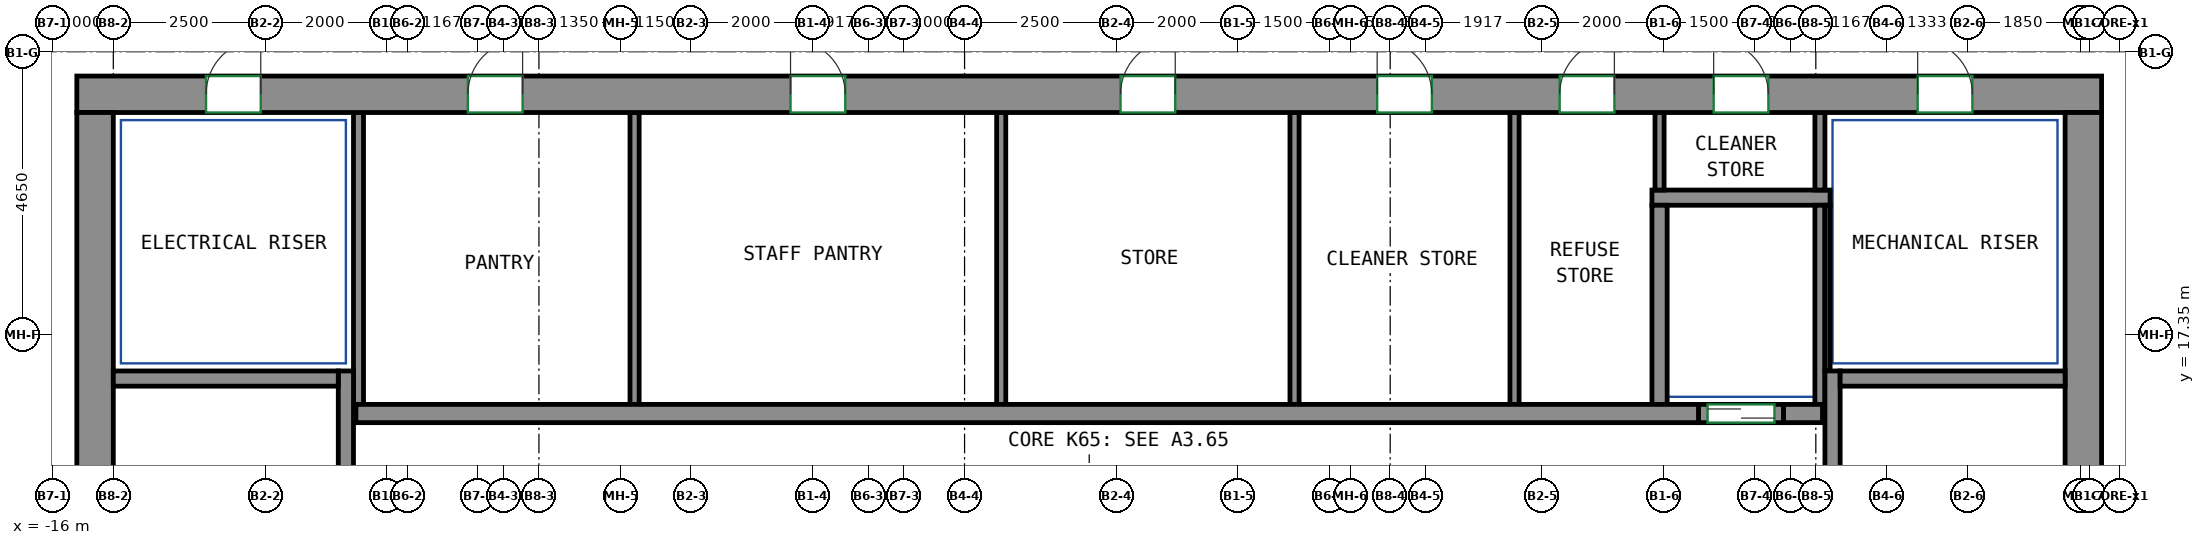
"""IFC4 building model, lengths in metres.
Left out: names, types, materials, properties, quantities, classifications, styles, units other than length and angle.
Written with IfcOpenShell. Run it as: python <this file> out.ifc"""

import sys

from ifc_helpers import new_model, si_unit, direction, frame, frame_2d, origin, place, context, subcontext, project, spatial, rectangle, extrude, source, transform, mapped, element, fill, save


model = new_model("IFC4")
c1 = context("Model", 3, precision=1e-05, world=origin(), true_north=direction((0.0, 1.0)))
c2 = subcontext(c1, "Body", "Model", "MODEL_VIEW")
j1 = project(units=[si_unit("LENGTHUNIT", "METRE"), si_unit("PLANEANGLEUNIT", "RADIAN")], contexts=[c1])
p1 = place(None, origin())
s1 = spatial("IfcSite", under=j1, at=p1, CompositionType="ELEMENT")
p2 = place(p1, origin())
s2 = spatial("IfcBuilding", under=s1, at=p2, CompositionType="ELEMENT")
p3 = place(p2, frame((0.0, 0.0, 262.8)))
s3 = spatial("IfcBuildingStorey", under=s2, at=p3, CompositionType="ELEMENT", Elevation=262.8)
m1 = source(origin(), c2, "Body", "SweptSolid", [
    extrude(rectangle(XDim=33.3, YDim=0.6, at=frame_2d((16.65, 0.0))), origin(), (0.0, 0.0, 1.0), 3.8),
])
p4 = place(p3, frame((-15.6, 21.3, 0.0), z_axis=(0.0, 0.0, 1.0), x_axis=(1.0, 0.0, 0.0)))
e1 = element("IfcWall", 1, at=p4, inside=s3, PredefinedType="SHEAR", context=c2, shape_type="MappedRepresentation", body=[
    mapped(m1, transform((0.0, 0.0, 0.0))),
])
p5 = place(p4, frame((6.431, 0.0, 0.0)))
e2 = element("IfcOpeningElement", 2, at=p5, cuts=e1, PredefinedType="OPENING", context=c2, shape_type="SweptSolid", body=[
    extrude(rectangle(XDim=0.9, YDim=2.1, at=frame_2d((0.45, 1.05))), frame((0.0, 0.31, 0.0), z_axis=(0.0, -1.0, 0.0), x_axis=(1.0, 0.0, 0.0)), (0.0, 0.0, 1.0), 0.62),
])
p6 = place(p4, frame((11.738, 0.0, 0.0)))
e3 = element("IfcOpeningElement", 3, at=p6, cuts=e1, PredefinedType="OPENING", context=c2, shape_type="SweptSolid", body=[
    extrude(rectangle(XDim=0.9, YDim=2.1, at=frame_2d((0.45, 1.05))), frame((0.0, 0.31, 0.0), z_axis=(0.0, -1.0, 0.0), x_axis=(1.0, 0.0, 0.0)), (0.0, 0.0, 1.0), 0.62),
])
p7 = place(p4, frame((17.165, 0.0, 0.0)))
e4 = element("IfcOpeningElement", 4, at=p7, cuts=e1, PredefinedType="OPENING", context=c2, shape_type="SweptSolid", body=[
    extrude(rectangle(XDim=0.9, YDim=2.1, at=frame_2d((0.45, 1.05))), frame((0.0, 0.31, 0.0), z_axis=(0.0, -1.0, 0.0), x_axis=(1.0, 0.0, 0.0)), (0.0, 0.0, 1.0), 0.62),
])
p8 = place(p4, frame((21.386, 0.0, 0.0)))
e5 = element("IfcOpeningElement", 5, at=p8, cuts=e1, PredefinedType="OPENING", context=c2, shape_type="SweptSolid", body=[
    extrude(rectangle(XDim=0.9, YDim=2.1, at=frame_2d((0.45, 1.05))), frame((0.0, 0.31, 0.0), z_axis=(0.0, -1.0, 0.0), x_axis=(1.0, 0.0, 0.0)), (0.0, 0.0, 1.0), 0.62),
])
p9 = place(p4, frame((24.387, 0.0, 0.0)))
e6 = element("IfcOpeningElement", 6, at=p9, cuts=e1, PredefinedType="OPENING", context=c2, shape_type="SweptSolid", body=[
    extrude(rectangle(XDim=0.9, YDim=2.1, at=frame_2d((0.45, 1.05))), frame((0.0, 0.31, 0.0), z_axis=(0.0, -1.0, 0.0), x_axis=(1.0, 0.0, 0.0)), (0.0, 0.0, 1.0), 0.62),
])
p10 = place(p4, frame((26.92, 0.0, 0.0)))
e7 = element("IfcOpeningElement", 7, at=p10, cuts=e1, PredefinedType="OPENING", context=c2, shape_type="SweptSolid", body=[
    extrude(rectangle(XDim=0.9, YDim=2.1, at=frame_2d((0.45, 1.05))), frame((0.0, 0.31, 0.0), z_axis=(0.0, -1.0, 0.0), x_axis=(1.0, 0.0, 0.0)), (0.0, 0.0, 1.0), 0.62),
])
p11 = place(p4, frame((2.125, 0.0, 0.0)))
e8 = element("IfcOpeningElement", 8, at=p11, cuts=e1, PredefinedType="OPENING", context=c2, shape_type="SweptSolid", body=[
    extrude(rectangle(XDim=0.9, YDim=2.1, at=frame_2d((0.45, 1.05))), frame((0.0, 0.31, 0.0), z_axis=(0.0, -1.0, 0.0), x_axis=(1.0, 0.0, 0.0)), (0.0, 0.0, 1.0), 0.62),
])
p12 = place(p4, frame((30.275, 0.0, 0.0)))
e9 = element("IfcOpeningElement", 9, at=p12, cuts=e1, PredefinedType="OPENING", context=c2, shape_type="SweptSolid", body=[
    extrude(rectangle(XDim=0.9, YDim=2.1, at=frame_2d((0.45, 1.05))), frame((0.0, 0.31, 0.0), z_axis=(0.0, -1.0, 0.0), x_axis=(1.0, 0.0, 0.0)), (0.0, 0.0, 1.0), 0.62),
])
m2 = source(origin(), c2, "Body", "SweptSolid", [
    extrude(rectangle(XDim=12.0, YDim=0.6, at=frame_2d((6.0, 0.0))), origin(), (0.0, 0.0, 1.0), 3.8),
])
for number, where, z_axis, x_axis in (
    (10, (-15.3, 9.0, 0.0), (0.0, 0.0, 1.0), (0.0, 1.0, 0.0)),
    (11, (17.4, 9.0, 0.0), (0.0, 0.0, 1.0), (0.0, 1.0, 0.0)),
):
    element("IfcWall", number, at=place(p3, frame(where, z_axis=z_axis, x_axis=x_axis)), inside=s3, PredefinedType="SHEAR", context=c2, shape_type="MappedRepresentation", body=[
        mapped(m2, transform((0.0, 0.0, 0.0))),
    ])
m3 = source(origin(), c2, "Body", "SweptSolid", [
    extrude(rectangle(XDim=7.75, YDim=0.25, at=frame_2d((3.875, 0.0))), origin(), (0.0, 0.0, 1.0), 3.8),
])
p13 = place(p3, frame((-11.175, 9.0, 0.0), z_axis=(0.0, 0.0, 1.0), x_axis=(0.0, 1.0, 0.0)))
e12 = element("IfcWall", 12, at=p13, inside=s3, PredefinedType="SHEAR", context=c2, shape_type="MappedRepresentation", body=[
    mapped(m3, transform((0.0, 0.0, 0.0))),
])
m4 = source(origin(), c2, "Body", "SweptSolid", [
    extrude(rectangle(XDim=3.7, YDim=0.25, at=frame_2d((1.85, 0.0))), origin(), (0.0, 0.0, 1.0), 3.8),
])
p14 = place(p3, frame((-15.0, 16.625, 0.0), z_axis=(0.0, 0.0, 1.0), x_axis=(1.0, 0.0, 0.0)))
e13 = element("IfcWall", 13, at=p14, inside=s3, PredefinedType="SHEAR", context=c2, shape_type="MappedRepresentation", body=[
    mapped(m4, transform((0.0, 0.0, 0.0))),
])
p15 = place(p3, frame((13.275, 9.0, 0.0), z_axis=(0.0, 0.0, 1.0), x_axis=(0.0, 1.0, 0.0)))
e14 = element("IfcWall", 14, at=p15, inside=s3, PredefinedType="SHEAR", context=c2, shape_type="MappedRepresentation", body=[
    mapped(m3, transform((0.0, 0.0, 0.0))),
])
m5 = source(origin(), c2, "Body", "SweptSolid", [
    extrude(rectangle(XDim=3.7, YDim=0.25, at=frame_2d((1.85, 0.0))), origin(), (0.0, 0.0, 1.0), 3.8),
])
p16 = place(p3, frame((13.4, 16.625, 0.0), z_axis=(0.0, 0.0, 1.0), x_axis=(1.0, 0.0, 0.0)))
e15 = element("IfcWall", 15, at=p16, inside=s3, PredefinedType="SHEAR", context=c2, shape_type="MappedRepresentation", body=[
    mapped(m5, transform((0.0, 0.0, 0.0))),
])
m6 = source(origin(), c2, "Body", "SweptSolid", [
    extrude(rectangle(XDim=22.08, YDim=0.3, at=frame_2d((11.04, 0.0))), origin(), (0.0, 0.0, 1.0), 3.8),
])
p17 = place(p3, frame((-11.01, 16.05, 0.0), z_axis=(0.0, 0.0, 1.0), x_axis=(1.0, 0.0, 0.0)))
e16 = element("IfcWall", 16, at=p17, inside=s3, PredefinedType="SHEAR", context=c2, shape_type="MappedRepresentation", body=[
    mapped(m6, transform((0.0, 0.0, 0.0))),
])
m7 = source(origin(), c2, "Body", "SweptSolid", [
    extrude(rectangle(XDim=0.64, YDim=0.3, at=frame_2d((0.32, 0.0))), origin(), (0.0, 0.0, 1.0), 3.8),
])
p18 = place(p3, frame((12.47, 16.05, 0.0), z_axis=(0.0, 0.0, 1.0), x_axis=(1.0, 0.0, 0.0)))
e17 = element("IfcWall", 17, at=p18, inside=s3, PredefinedType="SHEAR", context=c2, shape_type="MappedRepresentation", body=[
    mapped(m7, transform((0.0, 0.0, 0.0))),
])
m8 = source(origin(), c2, "Body", "SweptSolid", [
    extrude(rectangle(XDim=1.4, YDim=0.3, at=frame_2d((0.7, 0.0))), origin(), (0.0, 0.0, 1.0), 3.8),
])
p19 = place(p3, frame((11.07, 16.05, 0.0), z_axis=(0.0, 0.0, 1.0), x_axis=(1.0, 0.0, 0.0)))
e18 = element("IfcWall", 18, at=p19, inside=s3, PredefinedType="PARTITIONING", context=c2, shape_type="MappedRepresentation", body=[
    mapped(m8, transform((0.0, 0.0, 0.0))),
])
p20 = place(p19, frame((0.15, 0.0, 0.0)))
e19 = element("IfcOpeningElement", 19, at=p20, cuts=e18, PredefinedType="OPENING", context=c2, shape_type="SweptSolid", body=[
    extrude(rectangle(XDim=1.1, YDim=2.1, at=frame_2d((0.55, 1.05))), frame((0.0, 0.16, 0.0), z_axis=(0.0, -1.0, 0.0), x_axis=(1.0, 0.0, 0.0)), (0.0, 0.0, 1.0), 0.32),
])
m9 = source(origin(), c2, "Body", "SweptSolid", [
    extrude(rectangle(XDim=2.93, YDim=0.25, at=frame_2d((1.465, 0.0))), origin(), (0.0, 0.0, 1.0), 3.8),
])
p21 = place(p3, frame((10.305, 19.6, 0.0), z_axis=(0.0, 0.0, 1.0), x_axis=(1.0, 0.0, 0.0)))
e20 = element("IfcWall", 20, at=p21, inside=s3, PredefinedType="PARTITIONING", context=c2, shape_type="MappedRepresentation", body=[
    mapped(m9, transform((0.0, 0.0, 0.0))),
])
m10 = source(origin(), c2, "Body", "SweptSolid", [
    extrude(rectangle(XDim=3.275, YDim=0.165, at=frame_2d((1.638, 0.0))), origin(), (0.0, 0.0, 1.0), 3.8),
])
p22 = place(p3, frame((13.067, 16.2, 0.0), z_axis=(0.0, 0.0, 1.0), x_axis=(0.0, 1.0, 0.0)))
e21 = element("IfcWall", 21, at=p22, inside=s3, PredefinedType="PARTITIONING", context=c2, shape_type="MappedRepresentation", body=[
    mapped(m10, transform((0.0, 0.0, 0.0))),
])
m11 = source(origin(), c2, "Body", "SweptSolid", [
    extrude(rectangle(XDim=1.275, YDim=0.165, at=frame_2d((0.637, 0.0))), origin(), (0.0, 0.0, 1.0), 3.8),
])
p23 = place(p3, frame((13.067, 19.725, 0.0), z_axis=(0.0, 0.0, 1.0), x_axis=(0.0, 1.0, 0.0)))
e22 = element("IfcWall", 22, at=p23, inside=s3, PredefinedType="PARTITIONING", context=c2, shape_type="MappedRepresentation", body=[
    mapped(m11, transform((0.0, 0.0, 0.0))),
])
m12 = source(origin(), c2, "Body", "SweptSolid", [
    extrude(rectangle(XDim=4.8, YDim=0.165, at=frame_2d((2.4, 0.0))), origin(), (0.0, 0.0, 1.0), 3.8),
])
p24 = place(p3, frame((-10.968, 16.2, 0.0), z_axis=(0.0, 0.0, 1.0), x_axis=(0.0, 1.0, 0.0)))
e23 = element("IfcWall", 23, at=p24, inside=s3, PredefinedType="PARTITIONING", context=c2, shape_type="MappedRepresentation", body=[
    mapped(m12, transform((0.0, 0.0, 0.0))),
])
m13 = source(origin(), c2, "Body", "SweptSolid", [
    extrude(rectangle(XDim=3.275, YDim=0.25, at=frame_2d((1.638, 0.0))), origin(), (0.0, 0.0, 1.0), 3.8),
])
p25 = place(p3, frame((10.43, 16.2, 0.0), z_axis=(0.0, 0.0, 1.0), x_axis=(0.0, 1.0, 0.0)))
e24 = element("IfcWall", 24, at=p25, inside=s3, PredefinedType="PARTITIONING", context=c2, shape_type="MappedRepresentation", body=[
    mapped(m13, transform((0.0, 0.0, 0.0))),
])
m14 = source(origin(), c2, "Body", "SweptSolid", [
    extrude(rectangle(XDim=2.725, YDim=0.085, at=frame_2d((1.363, 0.0))), origin(), (0.0, 0.0, 1.0), 3.8),
])
p26 = place(p3, frame((13.192, 16.75, 0.0), z_axis=(0.0, 0.0, 1.0), x_axis=(0.0, 1.0, 0.0)))
e25 = element("IfcWall", 25, at=p26, inside=s3, PredefinedType="PARTITIONING", context=c2, shape_type="MappedRepresentation", body=[
    mapped(m14, transform((0.0, 0.0, 0.0))),
])
m15 = source(origin(), c2, "Body", "SweptSolid", [
    extrude(rectangle(XDim=4.8, YDim=0.15, at=frame_2d((2.4, 0.0))), origin(), (0.0, 0.0, 1.0), 3.8),
])
for number, where, z_axis, x_axis in (
    (26, (-6.427, 16.2, 0.0), (0.0, 0.0, 1.0), (0.0, 1.0, 0.0)),
    (27, (-0.397, 16.2, 0.0), (0.0, 0.0, 1.0), (0.0, 1.0, 0.0)),
    (28, (4.427, 16.2, 0.0), (0.0, 0.0, 1.0), (0.0, 1.0, 0.0)),
    (29, (8.045, 16.2, 0.0), (0.0, 0.0, 1.0), (0.0, 1.0, 0.0)),
):
    element("IfcWall", number, at=place(p3, frame(where, z_axis=z_axis, x_axis=x_axis)), inside=s3, PredefinedType="PARTITIONING", context=c2, shape_type="MappedRepresentation", body=[
        mapped(m15, transform((0.0, 0.0, 0.0))),
    ])
m16 = source(origin(), c2, "Body", "SweptSolid", [
    extrude(rectangle(XDim=1.275, YDim=0.15, at=frame_2d((0.637, 0.0))), origin(), (0.0, 0.0, 1.0), 3.8),
])
p27 = place(p3, frame((10.43, 19.725, 0.0), z_axis=(0.0, 0.0, 1.0), x_axis=(0.0, 1.0, 0.0)))
e30 = element("IfcWall", 30, at=p27, inside=s3, PredefinedType="PARTITIONING", context=c2, shape_type="MappedRepresentation", body=[
    mapped(m16, transform((0.0, 0.0, 0.0))),
])
p28 = place(p20, origin())
e31 = element("IfcDoor", 31, at=p28, inside=s3, OperationType="DOUBLE_DOOR_SLIDING", PredefinedType="DOOR", context=c2, shape_type="SweptSolid", body=[
    extrude(rectangle(XDim=1.1, YDim=2.1, at=frame_2d((0.55, 1.05))), frame((0.0, 0.025, 0.0), z_axis=(0.0, -1.0, 0.0), x_axis=(1.0, 0.0, 0.0)), (0.0, 0.0, 1.0), 0.05),
])
fill(e19, e31)
p29 = place(p5, origin())
e32 = element("IfcDoor", 32, at=p29, inside=s3, OperationType="SINGLE_SWING_RIGHT", PredefinedType="DOOR", context=c2, shape_type="SweptSolid", body=[
    extrude(rectangle(XDim=0.9, YDim=2.1, at=frame_2d((0.45, 1.05))), frame((0.0, -0.155, 0.0), z_axis=(0.0, -1.0, 0.0), x_axis=(1.0, 0.0, 0.0)), (0.0, 0.0, 1.0), 0.05),
])
fill(e2, e32)
p30 = place(p6, origin())
e33 = element("IfcDoor", 33, at=p30, inside=s3, OperationType="SINGLE_SWING_LEFT", PredefinedType="DOOR", context=c2, shape_type="SweptSolid", body=[
    extrude(rectangle(XDim=0.9, YDim=2.1, at=frame_2d((0.45, 1.05))), frame((0.0, -0.155, 0.0), z_axis=(0.0, -1.0, 0.0), x_axis=(1.0, 0.0, 0.0)), (0.0, 0.0, 1.0), 0.05),
])
fill(e3, e33)
p31 = place(p7, origin())
e34 = element("IfcDoor", 34, at=p31, inside=s3, OperationType="SINGLE_SWING_RIGHT", PredefinedType="DOOR", context=c2, shape_type="SweptSolid", body=[
    extrude(rectangle(XDim=0.9, YDim=2.1, at=frame_2d((0.45, 1.05))), frame((0.0, -0.155, 0.0), z_axis=(0.0, -1.0, 0.0), x_axis=(1.0, 0.0, 0.0)), (0.0, 0.0, 1.0), 0.05),
])
fill(e4, e34)
p32 = place(p8, origin())
e35 = element("IfcDoor", 35, at=p32, inside=s3, OperationType="SINGLE_SWING_LEFT", PredefinedType="DOOR", context=c2, shape_type="SweptSolid", body=[
    extrude(rectangle(XDim=0.9, YDim=2.1, at=frame_2d((0.45, 1.05))), frame((0.0, -0.155, 0.0), z_axis=(0.0, -1.0, 0.0), x_axis=(1.0, 0.0, 0.0)), (0.0, 0.0, 1.0), 0.05),
])
fill(e5, e35)
p33 = place(p9, origin())
e36 = element("IfcDoor", 36, at=p33, inside=s3, OperationType="SINGLE_SWING_RIGHT", PredefinedType="DOOR", context=c2, shape_type="SweptSolid", body=[
    extrude(rectangle(XDim=0.9, YDim=2.1, at=frame_2d((0.45, 1.05))), frame((0.0, -0.155, 0.0), z_axis=(0.0, -1.0, 0.0), x_axis=(1.0, 0.0, 0.0)), (0.0, 0.0, 1.0), 0.05),
])
fill(e6, e36)
p34 = place(p10, origin())
e37 = element("IfcDoor", 37, at=p34, inside=s3, OperationType="SINGLE_SWING_LEFT", PredefinedType="DOOR", context=c2, shape_type="SweptSolid", body=[
    extrude(rectangle(XDim=0.9, YDim=2.1, at=frame_2d((0.45, 1.05))), frame((0.0, -0.155, 0.0), z_axis=(0.0, -1.0, 0.0), x_axis=(1.0, 0.0, 0.0)), (0.0, 0.0, 1.0), 0.05),
])
fill(e7, e37)
p35 = place(p11, origin())
e38 = element("IfcDoor", 38, at=p35, inside=s3, OperationType="SINGLE_SWING_RIGHT", PredefinedType="DOOR", context=c2, shape_type="SweptSolid", body=[
    extrude(rectangle(XDim=0.9, YDim=2.1, at=frame_2d((0.45, 1.05))), frame((0.0, -0.155, 0.0), z_axis=(0.0, -1.0, 0.0), x_axis=(1.0, 0.0, 0.0)), (0.0, 0.0, 1.0), 0.05),
])
fill(e8, e38)
p36 = place(p12, origin())
e39 = element("IfcDoor", 39, at=p36, inside=s3, OperationType="SINGLE_SWING_LEFT", PredefinedType="DOOR", context=c2, shape_type="SweptSolid", body=[
    extrude(rectangle(XDim=0.9, YDim=2.1, at=frame_2d((0.45, 1.05))), frame((0.0, -0.155, 0.0), z_axis=(0.0, -1.0, 0.0), x_axis=(1.0, 0.0, 0.0)), (0.0, 0.0, 1.0), 0.05),
])
fill(e9, e39)
save(model, sys.argv[1])
